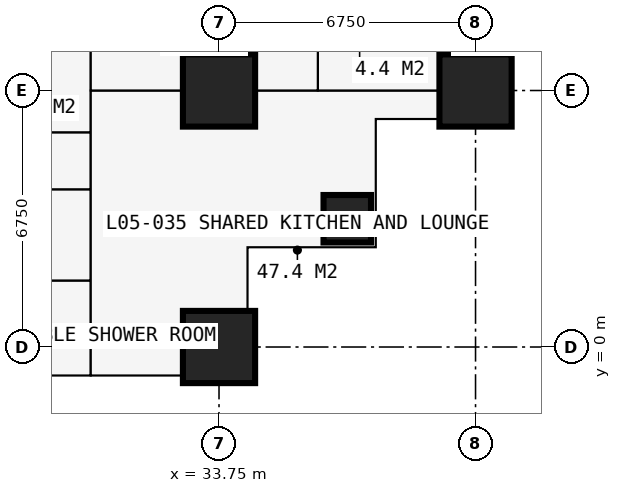
"""IFC4 building model, lengths in metres.
Left out: names, types, materials, properties, quantities, classifications, styles, units other than length and angle.
Written with IfcOpenShell. Run it as: python <this file> out.ifc"""

import sys

from ifc_helpers import new_model, si_unit, direction, frame, frame_2d, origin, origin_2d, place, context, subcontext, project, spatial, rectangle, extrude, element, fill, save


model = new_model("IFC4")
c1 = context("Model", 3, precision=1e-05, world=origin(), true_north=direction((0.0, 1.0)))
c2 = subcontext(c1, "Body", "Model", "MODEL_VIEW")
j1 = project(units=[si_unit("LENGTHUNIT", "METRE"), si_unit("PLANEANGLEUNIT", "RADIAN")], contexts=[c1])
p1 = place(None, origin())
s1 = spatial("IfcSite", under=j1, at=p1, CompositionType="ELEMENT")
p2 = place(p1, origin())
s2 = spatial("IfcBuilding", under=s1, at=p2, CompositionType="ELEMENT")
p3 = place(p2, frame((0.0, 0.0, 21.6)))
s3 = spatial("IfcBuildingStorey", under=s2, at=p3, CompositionType="ELEMENT", Elevation=21.6)
for number, where, z_axis, x_axis in (
    (1, (33.75, 0.0, 0.0), (0.0, 0.0, 1.0), (1.0, 0.0, 0.0)),
    (2, (33.75, 6.75, 0.0), (0.0, 0.0, 1.0), (1.0, 0.0, 0.0)),
):
    element("IfcColumn", number, at=place(p3, frame(where, z_axis=z_axis, x_axis=x_axis)), inside=s3, PredefinedType="COLUMN", context=c2, shape_type="SweptSolid", body=[
        extrude(rectangle(XDim=1.9, YDim=1.9, at=origin_2d()), origin(), (0.0, 0.0, 1.0), 3.6),
    ])
p4 = place(p3, frame((37.125, 3.375, 0.0), z_axis=(0.0, 0.0, 1.0), x_axis=(1.0, 0.0, 0.0)))
e3 = element("IfcColumn", 3, at=p4, inside=s3, PredefinedType="COLUMN", context=c2, shape_type="SweptSolid", body=[
    extrude(rectangle(XDim=1.25, YDim=1.25, at=origin_2d()), origin(), (0.0, 0.0, 1.0), 3.6),
])
p5 = place(p3, frame((40.5, 6.75, 0.0), z_axis=(0.0, 0.0, 1.0), x_axis=(1.0, 0.0, 0.0)))
e4 = element("IfcColumn", 4, at=p5, inside=s3, PredefinedType="COLUMN", context=c2, shape_type="SweptSolid", body=[
    extrude(rectangle(XDim=1.9, YDim=1.9, at=origin_2d()), origin(), (0.0, 0.0, 1.0), 3.6),
])
p6 = place(p3, frame((34.5, -0.75, 0.0), z_axis=(0.0, 0.0, 1.0), x_axis=(0.0, 1.0, 0.0)))
e5 = element("IfcWall", 5, at=p6, inside=s3, PredefinedType="SOLIDWALL", context=c2, shape_type="SweptSolid", body=[
    extrude(rectangle(XDim=3.375, YDim=0.3, at=frame_2d((1.688, 0.0))), origin(), (0.0, 0.0, 1.0), 3.375),
])
p7 = place(p6, frame((1.857, 0.0, 0.9)))
e6 = element("IfcOpeningElement", 6, at=p7, cuts=e5, PredefinedType="OPENING", context=c2, shape_type="SweptSolid", body=[
    extrude(rectangle(XDim=1.2, YDim=1.8, at=frame_2d((0.6, 0.9))), frame((0.0, 0.16, 0.0), z_axis=(0.0, -1.0, 0.0), x_axis=(1.0, 0.0, 0.0)), (0.0, 0.0, 1.0), 0.32),
])
p8 = place(p3, frame((34.5, 2.625, 0.0), z_axis=(0.0, 0.0, 1.0), x_axis=(1.0, 0.0, 0.0)))
e7 = element("IfcWall", 7, at=p8, inside=s3, PredefinedType="SOLIDWALL", context=c2, shape_type="SweptSolid", body=[
    extrude(rectangle(XDim=3.375, YDim=0.3, at=frame_2d((1.688, 0.0))), origin(), (0.0, 0.0, 1.0), 3.375),
])
p9 = place(p8, frame((0.788, 0.0, 0.6)))
e8 = element("IfcOpeningElement", 8, at=p9, cuts=e7, PredefinedType="OPENING", context=c2, shape_type="SweptSolid", body=[
    extrude(rectangle(XDim=1.8, YDim=2.1, at=frame_2d((0.9, 1.05))), frame((0.0, 0.16, 0.0), z_axis=(0.0, -1.0, 0.0), x_axis=(1.0, 0.0, 0.0)), (0.0, 0.0, 1.0), 0.32),
])
p10 = place(p3, frame((37.875, 2.625, 0.0), z_axis=(0.0, 0.0, 1.0), x_axis=(0.0, 1.0, 0.0)))
e9 = element("IfcWall", 9, at=p10, inside=s3, PredefinedType="SOLIDWALL", context=c2, shape_type="SweptSolid", body=[
    extrude(rectangle(XDim=3.375, YDim=0.3, at=frame_2d((1.688, 0.0))), origin(), (0.0, 0.0, 1.0), 3.375),
])
p11 = place(p10, frame((0.788, 0.0, 0.6)))
e10 = element("IfcOpeningElement", 10, at=p11, cuts=e9, PredefinedType="OPENING", context=c2, shape_type="SweptSolid", body=[
    extrude(rectangle(XDim=1.8, YDim=2.1, at=frame_2d((0.9, 1.05))), frame((0.0, 0.16, 0.0), z_axis=(0.0, -1.0, 0.0), x_axis=(1.0, 0.0, 0.0)), (0.0, 0.0, 1.0), 0.32),
])
p12 = place(p3, frame((37.875, 6.0, 0.0), z_axis=(0.0, 0.0, 1.0), x_axis=(1.0, 0.0, 0.0)))
e11 = element("IfcWall", 11, at=p12, inside=s3, PredefinedType="SOLIDWALL", context=c2, shape_type="SweptSolid", body=[
    extrude(rectangle(XDim=3.375, YDim=0.3, at=frame_2d((1.688, 0.0))), origin(), (0.0, 0.0, 1.0), 3.375),
])
p13 = place(p12, frame((0.317, 0.0, 0.9)))
e12 = element("IfcOpeningElement", 12, at=p13, cuts=e11, PredefinedType="OPENING", context=c2, shape_type="SweptSolid", body=[
    extrude(rectangle(XDim=1.2, YDim=1.8, at=frame_2d((0.6, 0.9))), frame((0.0, 0.16, 0.0), z_axis=(0.0, -1.0, 0.0), x_axis=(1.0, 0.0, 0.0)), (0.0, 0.0, 1.0), 0.32),
])
p14 = place(p3, frame((6.75, 4.15, 0.0), z_axis=(0.0, 0.0, 1.0), x_axis=(1.0, 0.0, 0.0)))
e13 = element("IfcWall", 13, at=p14, inside=s3, PredefinedType="PARTITIONING", context=c2, shape_type="SweptSolid", body=[
    extrude(rectangle(XDim=23.625, YDim=0.1, at=frame_2d((11.812, 0.0))), origin(), (0.0, 0.0, 1.0), 3.375),
])
p15 = place(p14, frame((0.2, 0.0, 0.0)))
e14 = element("IfcOpeningElement", 14, at=p15, cuts=e13, PredefinedType="OPENING", context=c2, shape_type="SweptSolid", body=[
    extrude(rectangle(XDim=0.95, YDim=2.2, at=frame_2d((0.475, 1.1))), frame((0.0, 0.06, 0.0), z_axis=(0.0, -1.0, 0.0), x_axis=(1.0, 0.0, 0.0)), (0.0, 0.0, 1.0), 0.12),
])
p16 = place(p14, frame((3.625, 0.0, 0.0)))
e15 = element("IfcOpeningElement", 15, at=p16, cuts=e13, PredefinedType="OPENING", context=c2, shape_type="SweptSolid", body=[
    extrude(rectangle(XDim=0.95, YDim=2.2, at=frame_2d((0.475, 1.1))), frame((0.0, 0.06, 0.0), z_axis=(0.0, -1.0, 0.0), x_axis=(1.0, 0.0, 0.0)), (0.0, 0.0, 1.0), 0.12),
])
p17 = place(p14, frame((7.0, 0.0, 0.0)))
e16 = element("IfcOpeningElement", 16, at=p17, cuts=e13, PredefinedType="OPENING", context=c2, shape_type="SweptSolid", body=[
    extrude(rectangle(XDim=0.95, YDim=2.2, at=frame_2d((0.475, 1.1))), frame((0.0, 0.06, 0.0), z_axis=(0.0, -1.0, 0.0), x_axis=(1.0, 0.0, 0.0)), (0.0, 0.0, 1.0), 0.12),
])
p18 = place(p14, frame((10.375, 0.0, 0.0)))
e17 = element("IfcOpeningElement", 17, at=p18, cuts=e13, PredefinedType="OPENING", context=c2, shape_type="SweptSolid", body=[
    extrude(rectangle(XDim=0.95, YDim=2.2, at=frame_2d((0.475, 1.1))), frame((0.0, 0.06, 0.0), z_axis=(0.0, -1.0, 0.0), x_axis=(1.0, 0.0, 0.0)), (0.0, 0.0, 1.0), 0.12),
])
p19 = place(p14, frame((18.475, 0.0, 0.0)))
e18 = element("IfcOpeningElement", 18, at=p19, cuts=e13, PredefinedType="OPENING", context=c2, shape_type="SweptSolid", body=[
    extrude(rectangle(XDim=0.95, YDim=2.2, at=frame_2d((0.475, 1.1))), frame((0.0, 0.06, 0.0), z_axis=(0.0, -1.0, 0.0), x_axis=(1.0, 0.0, 0.0)), (0.0, 0.0, 1.0), 0.12),
])
p20 = place(p14, frame((13.7, 0.0, 0.0)))
e19 = element("IfcOpeningElement", 19, at=p20, cuts=e13, PredefinedType="OPENING", context=c2, shape_type="SweptSolid", body=[
    extrude(rectangle(XDim=0.95, YDim=2.2, at=frame_2d((0.475, 1.1))), frame((0.0, 0.06, 0.0), z_axis=(0.0, -1.0, 0.0), x_axis=(1.0, 0.0, 0.0)), (0.0, 0.0, 1.0), 0.12),
])
p21 = place(p3, frame((22.988, 5.65, 0.0), z_axis=(0.0, 0.0, 1.0), x_axis=(1.0, 0.0, 0.0)))
e20 = element("IfcWall", 20, at=p21, inside=s3, PredefinedType="PARTITIONING", context=c2, shape_type="SweptSolid", body=[
    extrude(rectangle(XDim=7.387, YDim=0.15, at=frame_2d((3.694, 0.0))), origin(), (0.0, 0.0, 1.0), 3.375),
])
p22 = place(p21, frame((2.1, 0.0, 0.0)))
e21 = element("IfcOpeningElement", 21, at=p22, cuts=e20, PredefinedType="OPENING", context=c2, shape_type="SweptSolid", body=[
    extrude(rectangle(XDim=0.95, YDim=2.2, at=frame_2d((0.475, 1.1))), frame((0.0, 0.085, 0.0), z_axis=(0.0, -1.0, 0.0), x_axis=(1.0, 0.0, 0.0)), (0.0, 0.0, 1.0), 0.17),
])
p23 = place(p3, frame((27.775, 1.75, 0.0), z_axis=(0.0, 0.0, 1.0), x_axis=(1.0, 0.0, 0.0)))
e22 = element("IfcWall", 22, at=p23, inside=s3, PredefinedType="PARTITIONING", context=c2, shape_type="SweptSolid", body=[
    extrude(rectangle(XDim=2.6, YDim=0.1, at=frame_2d((1.3, 0.0))), origin(), (0.0, 0.0, 1.0), 3.375),
])
p24 = place(p23, frame((0.85, 0.0, 0.0)))
e23 = element("IfcOpeningElement", 23, at=p24, cuts=e22, PredefinedType="OPENING", context=c2, shape_type="SweptSolid", body=[
    extrude(rectangle(XDim=0.9, YDim=2.2, at=frame_2d((0.45, 1.1))), frame((0.0, 0.06, 0.0), z_axis=(0.0, -1.0, 0.0), x_axis=(1.0, 0.0, 0.0)), (0.0, 0.0, 1.0), 0.12),
])
p25 = place(p3, frame((30.375, -0.734, 0.0), z_axis=(0.0, 0.0, 1.0), x_axis=(0.0, 1.0, 0.0)))
e24 = element("IfcWall", 24, at=p25, inside=s3, PredefinedType="PARTITIONING", context=c2, shape_type="SweptSolid", body=[
    extrude(rectangle(XDim=12.034, YDim=0.15, at=frame_2d((6.017, 0.0))), origin(), (0.0, 0.0, 1.0), 3.375),
])
p26 = place(p3, frame((30.375, 6.75, 0.0), z_axis=(0.0, 0.0, 1.0), x_axis=(1.0, 0.0, 0.0)))
e25 = element("IfcWall", 25, at=p26, inside=s3, PredefinedType="PARTITIONING", context=c2, shape_type="SweptSolid", body=[
    extrude(rectangle(XDim=10.859, YDim=0.15, at=frame_2d((5.429, 0.0))), origin(), (0.0, 0.0, 1.0), 2.877),
])
p27 = place(p26, frame((1.4, 0.0, 0.0)))
e26 = element("IfcOpeningElement", 26, at=p27, cuts=e25, PredefinedType="OPENING", context=c2, shape_type="SweptSolid", body=[
    extrude(rectangle(XDim=1.0, YDim=2.2, at=frame_2d((0.5, 1.1))), frame((0.0, 0.085, 0.0), z_axis=(0.0, -1.0, 0.0), x_axis=(1.0, 0.0, 0.0)), (0.0, 0.0, 1.0), 0.17),
])
p28 = place(p3, frame((36.35, 6.75, 0.0), z_axis=(0.0, 0.0, 1.0), x_axis=(0.0, 1.0, 0.0)))
e27 = element("IfcWall", 27, at=p28, inside=s3, PredefinedType="PARTITIONING", context=c2, shape_type="SweptSolid", body=[
    extrude(rectangle(XDim=23.625, YDim=0.15, at=frame_2d((11.812, 0.0))), origin(), (0.0, 0.0, 1.0), 3.375),
])
p29 = place(p28, frame((0.2, 0.0, 0.0)))
e28 = element("IfcOpeningElement", 28, at=p29, cuts=e27, PredefinedType="OPENING", context=c2, shape_type="SweptSolid", body=[
    extrude(rectangle(XDim=0.95, YDim=2.2, at=frame_2d((0.475, 1.1))), frame((0.0, 0.085, 0.0), z_axis=(0.0, -1.0, 0.0), x_axis=(1.0, 0.0, 0.0)), (0.0, 0.0, 1.0), 0.17),
])
p30 = place(p28, frame((18.475, 0.0, 0.0)))
e29 = element("IfcOpeningElement", 29, at=p30, cuts=e27, PredefinedType="OPENING", context=c2, shape_type="SweptSolid", body=[
    extrude(rectangle(XDim=0.95, YDim=2.2, at=frame_2d((0.475, 1.1))), frame((0.0, 0.085, 0.0), z_axis=(0.0, -1.0, 0.0), x_axis=(1.0, 0.0, 0.0)), (0.0, 0.0, 1.0), 0.17),
])
p31 = place(p28, frame((11.725, 0.0, 0.0)))
e30 = element("IfcOpeningElement", 30, at=p31, cuts=e27, PredefinedType="OPENING", context=c2, shape_type="SweptSolid", body=[
    extrude(rectangle(XDim=0.95, YDim=2.2, at=frame_2d((0.475, 1.1))), frame((0.0, 0.085, 0.0), z_axis=(0.0, -1.0, 0.0), x_axis=(1.0, 0.0, 0.0)), (0.0, 0.0, 1.0), 0.17),
])
p32 = place(p28, frame((4.975, 0.0, 0.0)))
e31 = element("IfcOpeningElement", 31, at=p32, cuts=e27, PredefinedType="OPENING", context=c2, shape_type="SweptSolid", body=[
    extrude(rectangle(XDim=0.95, YDim=2.2, at=frame_2d((0.475, 1.1))), frame((0.0, 0.085, 0.0), z_axis=(0.0, -1.0, 0.0), x_axis=(1.0, 0.0, 0.0)), (0.0, 0.0, 1.0), 0.17),
])
p33 = place(p7, origin())
e32 = element("IfcWindow", 32, at=p33, inside=s3, PartitioningType="SINGLE_PANEL", PredefinedType="WINDOW", context=c2, shape_type="SweptSolid", body=[
    extrude(rectangle(XDim=1.2, YDim=1.8, at=frame_2d((0.6, 0.9))), frame((0.0, 0.03, 0.0), z_axis=(0.0, -1.0, 0.0), x_axis=(1.0, 0.0, 0.0)), (0.0, 0.0, 1.0), 0.06),
])
fill(e6, e32)
p34 = place(p9, origin())
e33 = element("IfcWindow", 33, at=p34, inside=s3, PartitioningType="SINGLE_PANEL", PredefinedType="WINDOW", context=c2, shape_type="SweptSolid", body=[
    extrude(rectangle(XDim=1.8, YDim=2.1, at=frame_2d((0.9, 1.05))), frame((0.0, 0.03, 0.0), z_axis=(0.0, -1.0, 0.0), x_axis=(1.0, 0.0, 0.0)), (0.0, 0.0, 1.0), 0.06),
])
fill(e8, e33)
p35 = place(p11, origin())
e34 = element("IfcWindow", 34, at=p35, inside=s3, PartitioningType="SINGLE_PANEL", PredefinedType="WINDOW", context=c2, shape_type="SweptSolid", body=[
    extrude(rectangle(XDim=1.8, YDim=2.1, at=frame_2d((0.9, 1.05))), frame((0.0, 0.03, 0.0), z_axis=(0.0, -1.0, 0.0), x_axis=(1.0, 0.0, 0.0)), (0.0, 0.0, 1.0), 0.06),
])
fill(e10, e34)
p36 = place(p13, origin())
e35 = element("IfcWindow", 35, at=p36, inside=s3, PartitioningType="SINGLE_PANEL", PredefinedType="WINDOW", context=c2, shape_type="SweptSolid", body=[
    extrude(rectangle(XDim=1.2, YDim=1.8, at=frame_2d((0.6, 0.9))), frame((0.0, 0.03, 0.0), z_axis=(0.0, -1.0, 0.0), x_axis=(1.0, 0.0, 0.0)), (0.0, 0.0, 1.0), 0.06),
])
fill(e12, e35)
p37 = place(p24, origin())
e36 = element("IfcDoor", 36, at=p37, inside=s3, OperationType="SINGLE_SWING_RIGHT", PredefinedType="DOOR", context=c2, shape_type="SweptSolid", body=[
    extrude(rectangle(XDim=0.9, YDim=2.2, at=frame_2d((0.45, 1.1))), frame((0.0, 0.025, 0.0), z_axis=(0.0, -1.0, 0.0), x_axis=(1.0, 0.0, 0.0)), (0.0, 0.0, 1.0), 0.05),
])
fill(e23, e36)
p38 = place(p27, origin())
e37 = element("IfcDoor", 37, at=p38, inside=s3, OperationType="SINGLE_SWING_LEFT", PredefinedType="DOOR", context=c2, shape_type="SweptSolid", body=[
    extrude(rectangle(XDim=1.0, YDim=2.2, at=frame_2d((0.5, 1.1))), frame((0.0, 0.025, 0.0), z_axis=(0.0, -1.0, 0.0), x_axis=(1.0, 0.0, 0.0)), (0.0, 0.0, 1.0), 0.05),
])
fill(e26, e37)
p39 = place(p29, origin())
e38 = element("IfcDoor", 38, at=p39, inside=s3, OperationType="SINGLE_SWING_LEFT", PredefinedType="DOOR", context=c2, shape_type="SweptSolid", body=[
    extrude(rectangle(XDim=0.95, YDim=2.2, at=frame_2d((0.475, 1.1))), frame((0.0, 0.025, 0.0), z_axis=(0.0, -1.0, 0.0), x_axis=(1.0, 0.0, 0.0)), (0.0, 0.0, 1.0), 0.05),
])
fill(e28, e38)
save(model, sys.argv[1])
